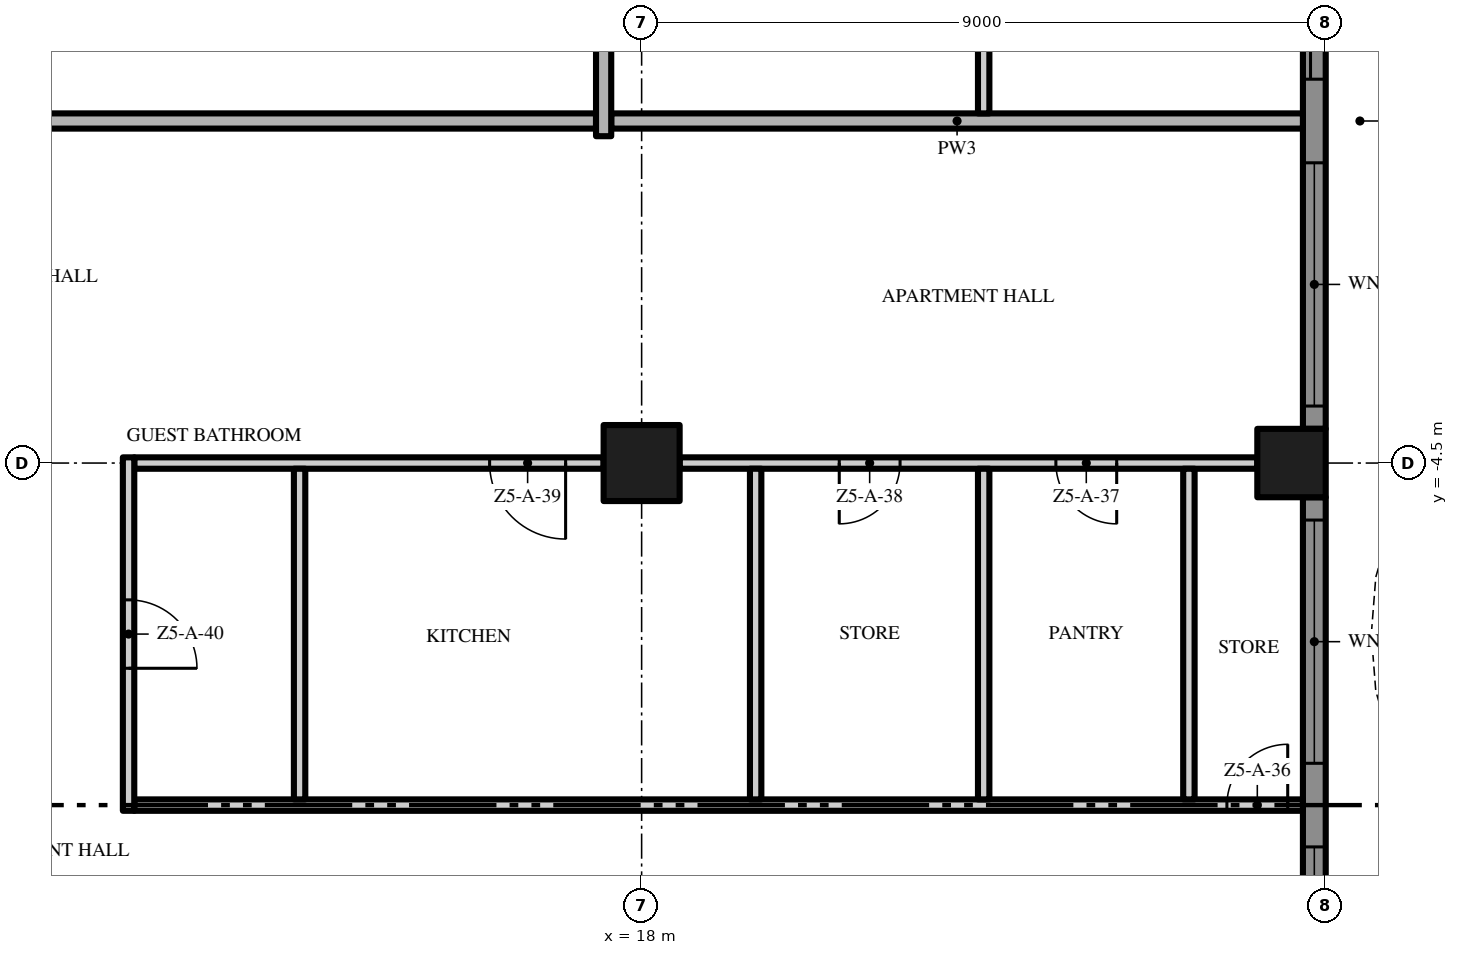
"""IFC4 building model, lengths in metres.
Left out: names, types, materials, properties, quantities, classifications, styles, units other than length and angle.
Written with IfcOpenShell. Run it as: python <this file> out.ifc"""

import sys

from ifc_helpers import new_model, si_unit, direction, frame, frame_2d, origin, origin_2d, place, context, subcontext, project, spatial, polyline, rectangle, outline, extrude, element, fill, save


model = new_model("IFC4")
c1 = context("Model", 3, precision=1e-05, world=origin(), true_north=direction((0.0, 1.0)))
c2 = subcontext(c1, "Body", "Model", "MODEL_VIEW")
j1 = project(units=[si_unit("LENGTHUNIT", "METRE"), si_unit("PLANEANGLEUNIT", "RADIAN")], contexts=[c1])
p1 = place(None, origin())
s1 = spatial("IfcSite", under=j1, at=p1, CompositionType="ELEMENT")
p2 = place(p1, origin())
s2 = spatial("IfcBuilding", under=s1, at=p2, CompositionType="ELEMENT")
p3 = place(p2, frame((0.0, 0.0, 242.6)))
s3 = spatial("IfcBuildingStorey", under=s2, at=p3, CompositionType="ELEMENT", Elevation=242.6)
p4 = place(p3, frame((18.0, -4.5, 0.0), z_axis=(0.0, 0.0, 1.0), x_axis=(1.0, 0.0, 0.0)))
e1 = element("IfcColumn", 1, at=p4, inside=s3, PredefinedType="COLUMN", context=c2, shape_type="SweptSolid", body=[
    extrude(rectangle(XDim=1.0, YDim=1.0, at=origin_2d()), origin(), (0.0, 0.0, 1.0), 3.5),
])
p5 = place(p3, frame((26.55, -4.5, 0.0), z_axis=(0.0, 0.0, 1.0), x_axis=(1.0, 0.0, 0.0)))
e2 = element("IfcColumn", 2, at=p5, inside=s3, PredefinedType="COLUMN", context=c2, shape_type="SweptSolid", body=[
    extrude(rectangle(XDim=0.9, YDim=0.9, at=origin_2d()), origin(), (0.0, 0.0, 1.0), 3.5),
])
p6 = place(p3, frame((26.85, -4.95, 0.0), z_axis=(0.0, 0.0, 1.0), x_axis=(0.0, -1.0, 0.0)))
e3 = element("IfcWall", 3, at=p6, inside=s3, PredefinedType="SOLIDWALL", context=c2, shape_type="SweptSolid", body=[
    extrude(rectangle(XDim=8.1, YDim=0.3, at=frame_2d((4.05, 0.0))), origin(), (0.0, 0.0, 1.0), 3.5),
])
p7 = place(p6, frame((4.6, 0.0, 0.45)))
e4 = element("IfcOpeningElement", 4, at=p7, cuts=e3, PredefinedType="OPENING", context=c2, shape_type="SweptSolid", body=[
    extrude(rectangle(XDim=3.2, YDim=2.65, at=frame_2d((1.6, 1.325))), frame((0.0, 0.16, 0.0), z_axis=(0.0, -1.0, 0.0), x_axis=(1.0, 0.0, 0.0)), (0.0, 0.0, 1.0), 0.32),
])
p8 = place(p6, frame((0.3, 0.0, 0.45)))
e5 = element("IfcOpeningElement", 5, at=p8, cuts=e3, PredefinedType="OPENING", context=c2, shape_type="SweptSolid", body=[
    extrude(rectangle(XDim=3.2, YDim=2.65, at=frame_2d((1.6, 1.325))), frame((0.0, 0.16, 0.0), z_axis=(0.0, -1.0, 0.0), x_axis=(1.0, 0.0, 0.0)), (0.0, 0.0, 1.0), 0.32),
])
p9 = place(p3, frame((26.85, 4.05, 0.0), z_axis=(0.0, 0.0, 1.0), x_axis=(0.0, -1.0, 0.0)))
e6 = element("IfcWall", 6, at=p9, inside=s3, PredefinedType="SOLIDWALL", context=c2, shape_type="SweptSolid", body=[
    extrude(rectangle(XDim=8.1, YDim=0.3, at=frame_2d((4.05, 0.0))), origin(), (0.0, 0.0, 1.0), 3.5),
])
p10 = place(p9, frame((4.6, 0.0, 0.45)))
e7 = element("IfcOpeningElement", 7, at=p10, cuts=e6, PredefinedType="OPENING", context=c2, shape_type="SweptSolid", body=[
    extrude(rectangle(XDim=3.2, YDim=2.65, at=frame_2d((1.6, 1.325))), frame((0.0, 0.16, 0.0), z_axis=(0.0, -1.0, 0.0), x_axis=(1.0, 0.0, 0.0)), (0.0, 0.0, 1.0), 0.32),
])
p11 = place(p9, frame((0.3, 0.0, 0.0)))
e8 = element("IfcOpeningElement", 8, at=p11, cuts=e6, PredefinedType="OPENING", context=c2, shape_type="SweptSolid", body=[
    extrude(rectangle(XDim=3.2, YDim=2.4, at=frame_2d((1.6, 1.2))), frame((0.0, 0.16, 0.0), z_axis=(0.0, -1.0, 0.0), x_axis=(1.0, 0.0, 0.0)), (0.0, 0.0, 1.0), 0.32),
])
p12 = place(p3, origin())
e9 = element("IfcWall", 9, at=p12, inside=s3, PredefinedType="USERDEFINED", context=c2, shape_type="SweptSolid", body=[
    extrude(outline(polyline([(28.8, -18.0), (29.505, -16.5), (29.941, -15.0), (30.0, -14.25), (29.941, -13.5), (29.505, -12.0), (28.8, -10.5), (28.095, -9.0), (27.659, -7.5), (27.6, -6.75), (27.659, -6.0), (28.095, -4.5), (28.8, -3.0), (29.505, -1.5), (29.941, 0.0), (30.0, 0.75), (29.941, 1.5), (29.505, 3.0), (28.8, 4.5), (28.095, 6.0), (27.659, 7.5), (27.6, 8.25), (27.659, 9.0), (28.095, 10.5), (28.8, 12.0), (29.505, 13.5), (29.941, 15.0), (30.0, 15.75), (29.941, 16.5), (29.505, 18.0), (29.265, 17.93), (29.694, 16.455), (29.749, 15.75), (29.694, 15.045), (29.271, 13.589), (28.574, 12.106), (27.86, 10.589), (27.411, 9.045), (27.349, 8.25), (27.411, 7.455), (27.86, 5.911), (28.574, 4.394), (29.271, 2.911), (29.694, 1.455), (29.749, 0.75), (29.694, 0.045), (29.271, -1.411), (28.574, -2.894), (27.86, -4.411), (27.411, -5.955), (27.349, -6.75), (27.411, -7.545), (27.86, -9.089), (28.574, -10.606), (29.271, -12.089), (29.694, -13.545), (29.749, -14.25), (29.694, -14.955), (29.271, -16.411), (28.574, -17.894), (28.8, -18.0)])), origin(), (0.0, 0.0, 1.0), 0.9),
])
p13 = place(p3, frame((11.325, -9.0, 0.0), z_axis=(0.0, 0.0, 1.0), x_axis=(1.0, 0.0, 0.0)))
e10 = element("IfcWall", 10, at=p13, inside=s3, PredefinedType="PARTITIONING", context=c2, shape_type="SweptSolid", body=[
    extrude(rectangle(XDim=15.375, YDim=0.15, at=frame_2d((7.688, 0.0))), origin(), (0.0, 0.0, 1.0), 3.5),
])
p14 = place(p13, frame((14.375, 0.0, 0.0)))
e11 = element("IfcOpeningElement", 11, at=p14, cuts=e10, PredefinedType="OPENING", context=c2, shape_type="SweptSolid", body=[
    extrude(rectangle(XDim=0.8, YDim=2.0, at=frame_2d((0.4, 1.0))), frame((0.0, 0.085, 0.0), z_axis=(0.0, -1.0, 0.0), x_axis=(1.0, 0.0, 0.0)), (0.0, 0.0, 1.0), 0.17),
])
p15 = place(p3, frame((17.5, -4.5, 0.0), z_axis=(0.0, 0.0, 1.0), x_axis=(-1.0, 0.0, 0.0)))
e12 = element("IfcWall", 12, at=p15, inside=s3, PredefinedType="PARTITIONING", context=c2, shape_type="SweptSolid", body=[
    extrude(rectangle(XDim=6.175, YDim=0.15, at=frame_2d((3.087, 0.0))), origin(), (0.0, 0.0, 1.0), 3.5),
])
p16 = place(p15, frame((0.5, 0.0, 0.0)))
e13 = element("IfcOpeningElement", 13, at=p16, cuts=e12, PredefinedType="OPENING", context=c2, shape_type="SweptSolid", body=[
    extrude(rectangle(XDim=1.0, YDim=2.4, at=frame_2d((0.5, 1.2))), frame((0.0, 0.085, 0.0), z_axis=(0.0, -1.0, 0.0), x_axis=(1.0, 0.0, 0.0)), (0.0, 0.0, 1.0), 0.17),
])
p17 = place(p3, frame((26.1, -4.5, 0.0), z_axis=(0.0, 0.0, 1.0), x_axis=(-1.0, 0.0, 0.0)))
e14 = element("IfcWall", 14, at=p17, inside=s3, PredefinedType="PARTITIONING", context=c2, shape_type="SweptSolid", body=[
    extrude(rectangle(XDim=7.6, YDim=0.15, at=frame_2d((3.8, 0.0))), origin(), (0.0, 0.0, 1.0), 3.5),
])
p18 = place(p17, frame((1.85, 0.0, 0.0)))
e15 = element("IfcOpeningElement", 15, at=p18, cuts=e14, PredefinedType="OPENING", context=c2, shape_type="SweptSolid", body=[
    extrude(rectangle(XDim=0.8, YDim=2.0, at=frame_2d((0.4, 1.0))), frame((0.0, 0.085, 0.0), z_axis=(0.0, -1.0, 0.0), x_axis=(1.0, 0.0, 0.0)), (0.0, 0.0, 1.0), 0.17),
])
p19 = place(p17, frame((4.7, 0.0, 0.0)))
e16 = element("IfcOpeningElement", 16, at=p19, cuts=e14, PredefinedType="OPENING", context=c2, shape_type="SweptSolid", body=[
    extrude(rectangle(XDim=0.8, YDim=2.0, at=frame_2d((0.4, 1.0))), frame((0.0, 0.085, 0.0), z_axis=(0.0, -1.0, 0.0), x_axis=(1.0, 0.0, 0.0)), (0.0, 0.0, 1.0), 0.17),
])
p20 = place(p3, frame((17.4, 0.0, 0.0), z_axis=(0.0, 0.0, 1.0), x_axis=(-1.0, 0.0, 0.0)))
e17 = element("IfcWall", 17, at=p20, inside=s3, PredefinedType="PARTITIONING", context=c2, shape_type="SweptSolid", body=[
    extrude(rectangle(XDim=34.8, YDim=0.2, at=frame_2d((17.4, 0.0))), origin(), (0.0, 0.0, 1.0), 3.5),
])
p21 = place(p20, frame((25.65, 0.0, 0.0)))
e18 = element("IfcOpeningElement", 18, at=p21, cuts=e17, PredefinedType="OPENING", context=c2, shape_type="SweptSolid", body=[
    extrude(rectangle(XDim=1.5, YDim=2.4, at=frame_2d((0.75, 1.2))), frame((0.0, 0.11, 0.0), z_axis=(0.0, -1.0, 0.0), x_axis=(1.0, 0.0, 0.0)), (0.0, 0.0, 1.0), 0.22),
])
p22 = place(p20, frame((7.65, 0.0, 0.0)))
e19 = element("IfcOpeningElement", 19, at=p22, cuts=e17, PredefinedType="OPENING", context=c2, shape_type="SweptSolid", body=[
    extrude(rectangle(XDim=1.5, YDim=2.4, at=frame_2d((0.75, 1.2))), frame((0.0, 0.11, 0.0), z_axis=(0.0, -1.0, 0.0), x_axis=(1.0, 0.0, 0.0)), (0.0, 0.0, 1.0), 0.22),
])
p23 = place(p3, frame((17.6, 0.0, 0.0), z_axis=(0.0, 0.0, 1.0), x_axis=(1.0, 0.0, 0.0)))
e20 = element("IfcWall", 20, at=p23, inside=s3, PredefinedType="PARTITIONING", context=c2, shape_type="SweptSolid", body=[
    extrude(rectangle(XDim=9.1, YDim=0.2, at=frame_2d((4.55, 0.0))), origin(), (0.0, 0.0, 1.0), 3.5),
])
p24 = place(p3, frame((11.25, -4.425, 0.0), z_axis=(0.0, 0.0, 1.0), x_axis=(0.0, -1.0, 0.0)))
e21 = element("IfcWall", 21, at=p24, inside=s3, PredefinedType="PARTITIONING", context=c2, shape_type="SweptSolid", body=[
    extrude(rectangle(XDim=4.65, YDim=0.15, at=frame_2d((2.325, 0.0))), origin(), (0.0, 0.0, 1.0), 3.5),
])
p25 = place(p24, frame((1.875, 0.0, 0.0)))
e22 = element("IfcOpeningElement", 22, at=p25, cuts=e21, PredefinedType="OPENING", context=c2, shape_type="SweptSolid", body=[
    extrude(rectangle(XDim=0.9, YDim=2.1, at=frame_2d((0.45, 1.05))), frame((0.0, 0.085, 0.0), z_axis=(0.0, -1.0, 0.0), x_axis=(1.0, 0.0, 0.0)), (0.0, 0.0, 1.0), 0.17),
])
p26 = place(p3, frame((13.5, -8.925, 0.0), z_axis=(0.0, 0.0, 1.0), x_axis=(0.0, 1.0, 0.0)))
e23 = element("IfcWall", 23, at=p26, inside=s3, PredefinedType="PARTITIONING", context=c2, shape_type="SweptSolid", body=[
    extrude(rectangle(XDim=4.35, YDim=0.15, at=frame_2d((2.175, 0.0))), origin(), (0.0, 0.0, 1.0), 3.5),
])
p27 = place(p3, frame((17.5, -0.2, 0.0), z_axis=(0.0, 0.0, 1.0), x_axis=(0.0, 1.0, 0.0)))
e24 = element("IfcWall", 24, at=p27, inside=s3, PredefinedType="PARTITIONING", context=c2, shape_type="SweptSolid", body=[
    extrude(rectangle(XDim=4.2, YDim=0.2, at=frame_2d((2.1, 0.0))), origin(), (0.0, 0.0, 1.0), 3.5),
])
for number, where, z_axis, x_axis in (
    (25, (19.5, -8.925, 0.0), (0.0, 0.0, 1.0), (0.0, 1.0, 0.0)),
    (26, (22.5, -8.925, 0.0), (0.0, 0.0, 1.0), (0.0, 1.0, 0.0)),
):
    element("IfcWall", number, at=place(p3, frame(where, z_axis=z_axis, x_axis=x_axis)), inside=s3, PredefinedType="PARTITIONING", context=c2, shape_type="SweptSolid", body=[
        extrude(rectangle(XDim=4.35, YDim=0.15, at=frame_2d((2.175, 0.0))), origin(), (0.0, 0.0, 1.0), 3.5),
    ])
p28 = place(p3, frame((22.5, 17.55, 0.0), z_axis=(0.0, 0.0, 1.0), x_axis=(0.0, -1.0, 0.0)))
e27 = element("IfcWall", 27, at=p28, inside=s3, PredefinedType="PARTITIONING", context=c2, shape_type="SweptSolid", body=[
    extrude(rectangle(XDim=17.45, YDim=0.15, at=frame_2d((8.725, 0.0))), origin(), (0.0, 0.0, 1.0), 3.5),
])
p29 = place(p28, frame((14.8, 0.0, 0.0)))
e28 = element("IfcOpeningElement", 28, at=p29, cuts=e27, PredefinedType="OPENING", context=c2, shape_type="SweptSolid", body=[
    extrude(rectangle(XDim=1.0, YDim=2.4, at=frame_2d((0.5, 1.2))), frame((0.0, 0.085, 0.0), z_axis=(0.0, -1.0, 0.0), x_axis=(1.0, 0.0, 0.0)), (0.0, 0.0, 1.0), 0.17),
])
p30 = place(p28, frame((11.45, 0.0, 0.0)))
e29 = element("IfcOpeningElement", 29, at=p30, cuts=e27, PredefinedType="OPENING", context=c2, shape_type="SweptSolid", body=[
    extrude(rectangle(XDim=1.0, YDim=2.4, at=frame_2d((0.5, 1.2))), frame((0.0, 0.085, 0.0), z_axis=(0.0, -1.0, 0.0), x_axis=(1.0, 0.0, 0.0)), (0.0, 0.0, 1.0), 0.17),
])
p31 = place(p28, frame((4.3, 0.0, 0.0)))
e30 = element("IfcOpeningElement", 30, at=p31, cuts=e27, PredefinedType="OPENING", context=c2, shape_type="SweptSolid", body=[
    extrude(rectangle(XDim=1.0, YDim=2.4, at=frame_2d((0.5, 1.2))), frame((0.0, 0.085, 0.0), z_axis=(0.0, -1.0, 0.0), x_axis=(1.0, 0.0, 0.0)), (0.0, 0.0, 1.0), 0.17),
])
p32 = place(p3, frame((25.2, -8.925, 0.0), z_axis=(0.0, 0.0, 1.0), x_axis=(0.0, 1.0, 0.0)))
e31 = element("IfcWall", 31, at=p32, inside=s3, PredefinedType="PARTITIONING", context=c2, shape_type="SweptSolid", body=[
    extrude(rectangle(XDim=4.35, YDim=0.15, at=frame_2d((2.175, 0.0))), origin(), (0.0, 0.0, 1.0), 3.5),
])
p33 = place(p7, origin())
e32 = element("IfcWindow", 32, at=p33, inside=s3, PartitioningType="SINGLE_PANEL", PredefinedType="WINDOW", context=c2, shape_type="SweptSolid", body=[
    extrude(rectangle(XDim=3.2, YDim=2.65, at=frame_2d((1.6, 1.325))), frame((0.0, 0.03, 0.0), z_axis=(0.0, -1.0, 0.0), x_axis=(1.0, 0.0, 0.0)), (0.0, 0.0, 1.0), 0.06),
])
fill(e4, e32)
p34 = place(p8, origin())
e33 = element("IfcWindow", 33, at=p34, inside=s3, PartitioningType="SINGLE_PANEL", PredefinedType="WINDOW", context=c2, shape_type="SweptSolid", body=[
    extrude(rectangle(XDim=3.2, YDim=2.65, at=frame_2d((1.6, 1.325))), frame((0.0, 0.03, 0.0), z_axis=(0.0, -1.0, 0.0), x_axis=(1.0, 0.0, 0.0)), (0.0, 0.0, 1.0), 0.06),
])
fill(e5, e33)
p35 = place(p10, origin())
e34 = element("IfcWindow", 34, at=p35, inside=s3, PartitioningType="SINGLE_PANEL", PredefinedType="WINDOW", context=c2, shape_type="SweptSolid", body=[
    extrude(rectangle(XDim=3.2, YDim=2.65, at=frame_2d((1.6, 1.325))), frame((0.0, 0.03, 0.0), z_axis=(0.0, -1.0, 0.0), x_axis=(1.0, 0.0, 0.0)), (0.0, 0.0, 1.0), 0.06),
])
fill(e7, e34)
p36 = place(p11, origin())
e35 = element("IfcDoor", 35, at=p36, inside=s3, OperationType="SINGLE_SWING_LEFT", PredefinedType="DOOR", context=c2, shape_type="SweptSolid", body=[
    extrude(rectangle(XDim=3.2, YDim=2.4, at=frame_2d((1.6, 1.2))), frame((0.0, 0.025, 0.0), z_axis=(0.0, -1.0, 0.0), x_axis=(1.0, 0.0, 0.0)), (0.0, 0.0, 1.0), 0.05),
])
fill(e8, e35)
p37 = place(p14, origin())
e36 = element("IfcDoor", 36, at=p37, inside=s3, OperationType="SINGLE_SWING_RIGHT", PredefinedType="DOOR", context=c2, shape_type="SweptSolid", body=[
    extrude(rectangle(XDim=0.8, YDim=2.0, at=frame_2d((0.4, 1.0))), frame((0.0, 0.025, 0.0), z_axis=(0.0, -1.0, 0.0), x_axis=(1.0, 0.0, 0.0)), (0.0, 0.0, 1.0), 0.05),
])
fill(e11, e36)
p38 = place(p18, origin())
e37 = element("IfcDoor", 37, at=p38, inside=s3, OperationType="SINGLE_SWING_LEFT", PredefinedType="DOOR", context=c2, shape_type="SweptSolid", body=[
    extrude(rectangle(XDim=0.8, YDim=2.0, at=frame_2d((0.4, 1.0))), frame((0.0, 0.025, 0.0), z_axis=(0.0, -1.0, 0.0), x_axis=(1.0, 0.0, 0.0)), (0.0, 0.0, 1.0), 0.05),
])
fill(e15, e37)
p39 = place(p19, origin())
e38 = element("IfcDoor", 38, at=p39, inside=s3, OperationType="SINGLE_SWING_RIGHT", PredefinedType="DOOR", context=c2, shape_type="SweptSolid", body=[
    extrude(rectangle(XDim=0.8, YDim=2.0, at=frame_2d((0.4, 1.0))), frame((0.0, 0.025, 0.0), z_axis=(0.0, -1.0, 0.0), x_axis=(1.0, 0.0, 0.0)), (0.0, 0.0, 1.0), 0.05),
])
fill(e16, e38)
p40 = place(p16, origin())
e39 = element("IfcDoor", 39, at=p40, inside=s3, OperationType="SINGLE_SWING_LEFT", PredefinedType="DOOR", context=c2, shape_type="SweptSolid", body=[
    extrude(rectangle(XDim=1.0, YDim=2.4, at=frame_2d((0.5, 1.2))), frame((0.0, 0.025, 0.0), z_axis=(0.0, -1.0, 0.0), x_axis=(1.0, 0.0, 0.0)), (0.0, 0.0, 1.0), 0.05),
])
fill(e13, e39)
p41 = place(p25, origin())
e40 = element("IfcDoor", 40, at=p41, inside=s3, OperationType="SINGLE_SWING_RIGHT", PredefinedType="DOOR", context=c2, shape_type="SweptSolid", body=[
    extrude(rectangle(XDim=0.9, YDim=2.1, at=frame_2d((0.45, 1.05))), frame((0.0, 0.025, 0.0), z_axis=(0.0, -1.0, 0.0), x_axis=(1.0, 0.0, 0.0)), (0.0, 0.0, 1.0), 0.05),
])
fill(e22, e40)
save(model, sys.argv[1])
